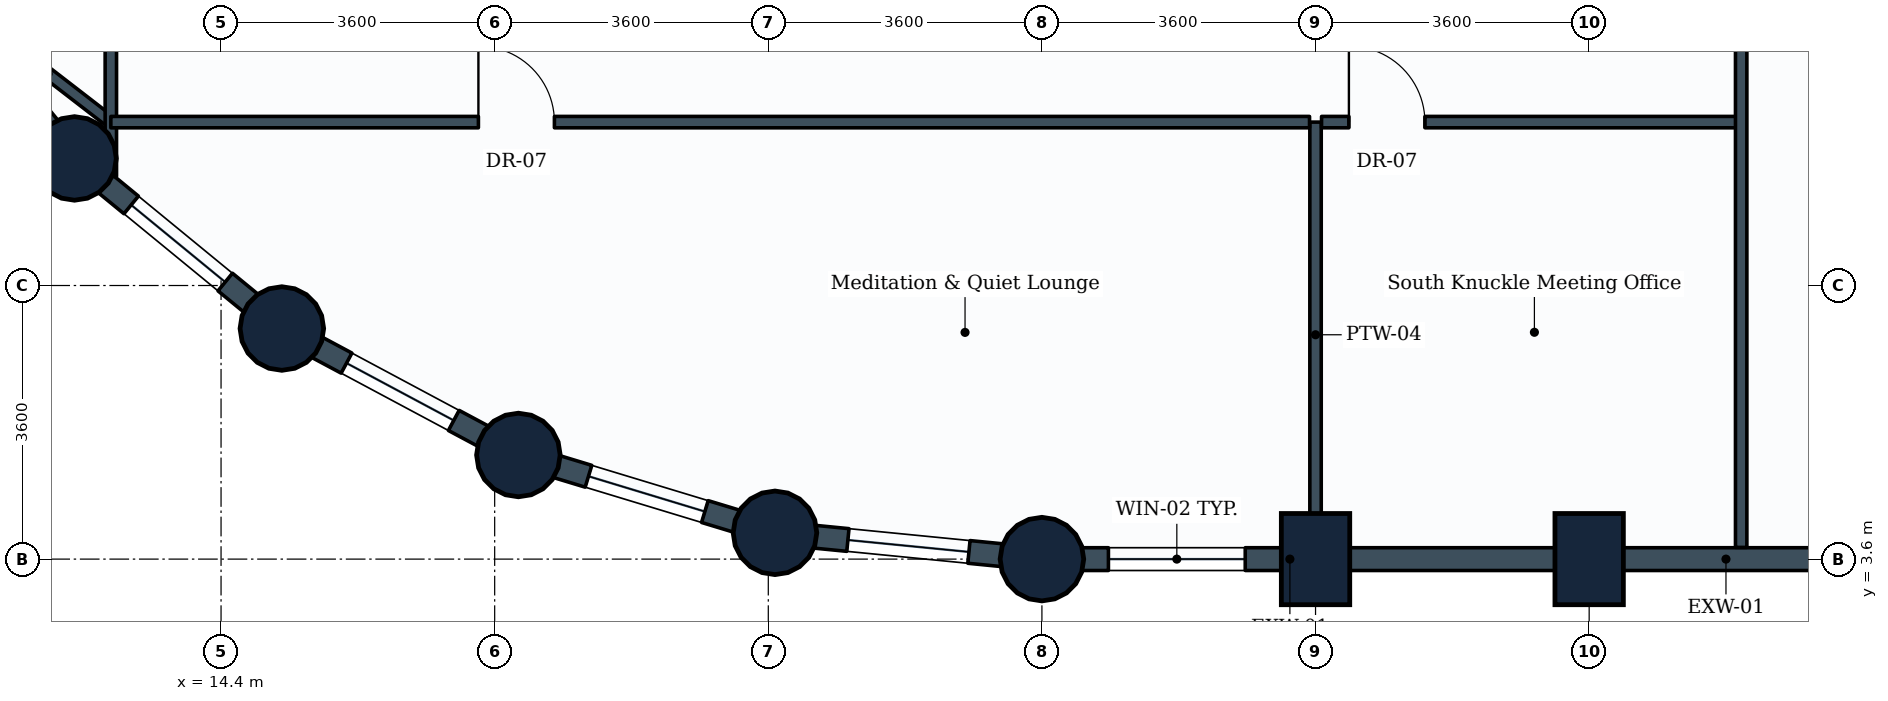
"""IFC4 building model, lengths in metres.
Left out: names, types, materials, properties, quantities, classifications, styles, units other than length and angle.
Written with IfcOpenShell. Run it as: python <this file> out.ifc"""

import sys

from ifc_helpers import new_model, si_unit, direction, frame, frame_2d, origin, origin_2d, place, context, subcontext, project, spatial, rectangle, circle, extrude, element, fill, save


model = new_model("IFC4")
c1 = context("Model", 3, precision=1e-05, world=origin(), true_north=direction((0.0, 1.0)))
c2 = subcontext(c1, "Body", "Model", "MODEL_VIEW")
j1 = project(units=[si_unit("LENGTHUNIT", "METRE"), si_unit("PLANEANGLEUNIT", "RADIAN")], contexts=[c1])
p1 = place(None, origin())
s1 = spatial("IfcSite", under=j1, at=p1, CompositionType="ELEMENT")
p2 = place(p1, origin())
s2 = spatial("IfcBuilding", under=s1, at=p2, CompositionType="ELEMENT")
p3 = place(p2, frame((0.0, 0.0, 55.2)))
s3 = spatial("IfcBuildingStorey", under=s2, at=p3, CompositionType="ELEMENT", Elevation=55.2)
for number, where, z_axis, x_axis in (
    (1, (12.472, 8.872, 0.0), (0.0, 0.0, 1.0), (1.0, 0.0, 0.0)),
    (2, (15.2, 6.634, 0.0), (0.0, 0.0, 1.0), (1.0, 0.0, 0.0)),
    (3, (18.312, 4.97, 0.0), (0.0, 0.0, 1.0), (1.0, 0.0, 0.0)),
    (4, (21.688, 3.946, 0.0), (0.0, 0.0, 1.0), (1.0, 0.0, 0.0)),
    (5, (25.2, 3.6, 0.0), (0.0, 0.0, 1.0), (1.0, 0.0, 0.0)),
):
    element("IfcColumn", number, at=place(p3, frame(where, z_axis=z_axis, x_axis=x_axis)), inside=s3, PredefinedType="COLUMN", context=c2, shape_type="SweptSolid", body=[
        extrude(circle(Radius=0.55, at=origin_2d()), origin(), (0.0, 0.0, 1.0), 3.9),
    ])
for number, where, z_axis, x_axis in (
    (6, (28.8, 3.6, 0.0), (0.0, 0.0, 1.0), (1.0, 0.0, 0.0)),
    (7, (32.4, 3.6, 0.0), (0.0, 0.0, 1.0), (1.0, 0.0, 0.0)),
):
    element("IfcColumn", number, at=place(p3, frame(where, z_axis=z_axis, x_axis=x_axis)), inside=s3, PredefinedType="COLUMN", context=c2, shape_type="SweptSolid", body=[
        extrude(rectangle(XDim=0.9, YDim=1.2, at=origin_2d()), origin(), (0.0, 0.0, 1.0), 3.9),
    ])
p4 = place(p3, frame((28.8, 3.6, 0.0), z_axis=(0.0, 0.0, 1.0), x_axis=(-1.0, 0.0, 0.0)))
e8 = element("IfcWall", 8, at=p4, inside=s3, PredefinedType="STANDARD", context=c2, shape_type="SweptSolid", body=[
    extrude(rectangle(XDim=3.6, YDim=0.3, at=frame_2d((1.8, 0.0))), origin(), (0.0, 0.0, 1.0), 2.93),
])
p5 = place(p4, frame((0.925, 0.0, 0.85)))
e9 = element("IfcOpeningElement", 9, at=p5, cuts=e8, PredefinedType="OPENING", context=c2, shape_type="SweptSolid", body=[
    extrude(rectangle(XDim=1.8, YDim=1.35, at=frame_2d((0.9, 0.675))), frame((0.0, 0.16, 0.0), z_axis=(0.0, -1.0, 0.0), x_axis=(1.0, 0.0, 0.0)), (0.0, 0.0, 1.0), 0.32),
])
p6 = place(p3, frame((32.4, 3.6, 0.0), z_axis=(0.0, 0.0, 1.0), x_axis=(-1.0, 0.0, 0.0)))
e10 = element("IfcWall", 10, at=p6, inside=s3, PredefinedType="STANDARD", context=c2, shape_type="SweptSolid", body=[
    extrude(rectangle(XDim=3.6, YDim=0.3, at=frame_2d((1.8, 0.0))), origin(), (0.0, 0.0, 1.0), 2.93),
])
p7 = place(p3, frame((36.0, 3.6, 0.0), z_axis=(0.0, 0.0, 1.0), x_axis=(-1.0, 0.0, 0.0)))
e11 = element("IfcWall", 11, at=p7, inside=s3, PredefinedType="STANDARD", context=c2, shape_type="SweptSolid", body=[
    extrude(rectangle(XDim=3.6, YDim=0.3, at=frame_2d((1.8, 0.0))), origin(), (0.0, 0.0, 1.0), 2.93),
])
p8 = place(p3, frame((12.472, 8.872, 0.0), z_axis=(0.0, 0.0, 1.0), x_axis=(-0.634258295121, 0.773121216285, 0.0)))
e12 = element("IfcWall", 12, at=p8, inside=s3, PredefinedType="STANDARD", context=c2, shape_type="SweptSolid", body=[
    extrude(rectangle(XDim=3.529, YDim=0.3, at=frame_2d((1.764, 0.0))), origin(), (0.0, 0.0, 1.0), 2.93),
])
p9 = place(p3, frame((15.2, 6.634, 0.0), z_axis=(0.0, 0.0, 1.0), x_axis=(-0.773121216285, 0.634258295121, 0.0)))
e13 = element("IfcWall", 13, at=p9, inside=s3, PredefinedType="STANDARD", context=c2, shape_type="SweptSolid", body=[
    extrude(rectangle(XDim=3.529, YDim=0.3, at=frame_2d((1.764, 0.0))), origin(), (0.0, 0.0, 1.0), 2.93),
])
p10 = place(p9, frame((0.964, 0.0, 0.85)))
e14 = element("IfcOpeningElement", 14, at=p10, cuts=e13, PredefinedType="OPENING", context=c2, shape_type="SweptSolid", body=[
    extrude(rectangle(XDim=1.6, YDim=1.35, at=frame_2d((0.8, 0.675))), frame((0.0, 0.16, 0.0), z_axis=(0.0, -1.0, 0.0), x_axis=(1.0, 0.0, 0.0)), (0.0, 0.0, 1.0), 0.32),
])
p11 = place(p3, frame((18.312, 4.97, 0.0), z_axis=(0.0, 0.0, 1.0), x_axis=(-0.881846862014, 0.471535907389, 0.0)))
e15 = element("IfcWall", 15, at=p11, inside=s3, PredefinedType="STANDARD", context=c2, shape_type="SweptSolid", body=[
    extrude(rectangle(XDim=3.529, YDim=0.3, at=frame_2d((1.765, 0.0))), origin(), (0.0, 0.0, 1.0), 2.93),
])
p12 = place(p11, frame((0.964, 0.0, 0.85)))
e16 = element("IfcOpeningElement", 16, at=p12, cuts=e15, PredefinedType="OPENING", context=c2, shape_type="SweptSolid", body=[
    extrude(rectangle(XDim=1.6, YDim=1.35, at=frame_2d((0.8, 0.675))), frame((0.0, 0.16, 0.0), z_axis=(0.0, -1.0, 0.0), x_axis=(1.0, 0.0, 0.0)), (0.0, 0.0, 1.0), 0.32),
])
p13 = place(p3, frame((21.688, 3.946, 0.0), z_axis=(0.0, 0.0, 1.0), x_axis=(-0.956953367403, 0.290241714123, 0.0)))
e17 = element("IfcWall", 17, at=p13, inside=s3, PredefinedType="STANDARD", context=c2, shape_type="SweptSolid", body=[
    extrude(rectangle(XDim=3.528, YDim=0.3, at=frame_2d((1.764, 0.0))), origin(), (0.0, 0.0, 1.0), 2.93),
])
p14 = place(p13, frame((0.964, 0.0, 0.85)))
e18 = element("IfcOpeningElement", 18, at=p14, cuts=e17, PredefinedType="OPENING", context=c2, shape_type="SweptSolid", body=[
    extrude(rectangle(XDim=1.6, YDim=1.35, at=frame_2d((0.8, 0.675))), frame((0.0, 0.16, 0.0), z_axis=(0.0, -1.0, 0.0), x_axis=(1.0, 0.0, 0.0)), (0.0, 0.0, 1.0), 0.32),
])
p15 = place(p3, frame((25.2, 3.6, 0.0), z_axis=(0.0, 0.0, 1.0), x_axis=(-0.995183369056, 0.098030923459, 0.0)))
e19 = element("IfcWall", 19, at=p15, inside=s3, PredefinedType="STANDARD", context=c2, shape_type="SweptSolid", body=[
    extrude(rectangle(XDim=3.529, YDim=0.3, at=frame_2d((1.765, 0.0))), origin(), (0.0, 0.0, 1.0), 2.93),
])
p16 = place(p15, frame((0.965, 0.0, 0.85)))
e20 = element("IfcOpeningElement", 20, at=p16, cuts=e19, PredefinedType="OPENING", context=c2, shape_type="SweptSolid", body=[
    extrude(rectangle(XDim=1.6, YDim=1.35, at=frame_2d((0.8, 0.675))), frame((0.0, 0.16, 0.0), z_axis=(0.0, -1.0, 0.0), x_axis=(1.0, 0.0, 0.0)), (0.0, 0.0, 1.0), 0.32),
])
p17 = place(p3, frame((28.8, 9.35, 0.0), z_axis=(0.0, 0.0, 1.0), x_axis=(0.0, -1.0, 0.0)))
e21 = element("IfcWall", 21, at=p17, inside=s3, PredefinedType="PARTITIONING", context=c2, shape_type="SweptSolid", body=[
    extrude(rectangle(XDim=5.596, YDim=0.15, at=frame_2d((2.798, 0.0))), origin(), (0.0, 0.0, 1.0), 3.635),
])
p18 = place(p3, frame((12.95, 9.35, 0.0), z_axis=(0.0, 0.0, 1.0), x_axis=(-0.791573423038, 0.611074067474, 0.0)))
e22 = element("IfcWall", 22, at=p18, inside=s3, PredefinedType="PARTITIONING", context=c2, shape_type="SweptSolid", body=[
    extrude(rectangle(XDim=2.084, YDim=0.15, at=frame_2d((1.042, 0.0))), origin(), (0.0, 0.0, 1.0), 2.93),
])
p19 = place(p3, frame((12.95, 8.634, 0.0), z_axis=(0.0, 0.0, 1.0), x_axis=(0.0, 1.0, 0.0)))
e23 = element("IfcWall", 23, at=p19, inside=s3, PredefinedType="PARTITIONING", context=c2, shape_type="SweptSolid", body=[
    extrude(rectangle(XDim=7.887, YDim=0.15, at=frame_2d((3.944, 0.0))), origin(), (0.0, 0.0, 1.0), 2.93),
])
p20 = place(p19, frame((4.947, 0.0, 0.0)))
e24 = element("IfcOpeningElement", 24, at=p20, cuts=e23, PredefinedType="OPENING", context=c2, shape_type="SweptSolid", body=[
    extrude(rectangle(XDim=1.0, YDim=2.1, at=frame_2d((0.5, 1.05))), frame((0.0, 0.085, 0.0), z_axis=(0.0, -1.0, 0.0), x_axis=(1.0, 0.0, 0.0)), (0.0, 0.0, 1.0), 0.17),
])
p21 = place(p3, frame((12.95, 9.35, 0.0), z_axis=(0.0, 0.0, 1.0), x_axis=(1.0, 0.0, 0.0)))
e25 = element("IfcWall", 25, at=p21, inside=s3, PredefinedType="PARTITIONING", context=c2, shape_type="SweptSolid", body=[
    extrude(rectangle(XDim=15.771, YDim=0.15, at=frame_2d((7.885, 0.0))), origin(), (0.0, 0.0, 1.0), 3.04),
])
p22 = place(p21, frame((4.836, 0.0, 0.0)))
e26 = element("IfcOpeningElement", 26, at=p22, cuts=e25, PredefinedType="OPENING", context=c2, shape_type="SweptSolid", body=[
    extrude(rectangle(XDim=1.0, YDim=2.1, at=frame_2d((0.5, 1.05))), frame((0.0, 0.085, 0.0), z_axis=(0.0, -1.0, 0.0), x_axis=(1.0, 0.0, 0.0)), (0.0, 0.0, 1.0), 0.17),
])
p23 = place(p3, frame((28.879, 9.35, 0.0), z_axis=(0.0, 0.0, 1.0), x_axis=(1.0, 0.0, 0.0)))
e27 = element("IfcWall", 27, at=p23, inside=s3, PredefinedType="PARTITIONING", context=c2, shape_type="SweptSolid", body=[
    extrude(rectangle(XDim=5.521, YDim=0.15, at=frame_2d((2.76, 0.0))), origin(), (0.0, 0.0, 1.0), 3.635),
])
p24 = place(p23, frame((0.36, 0.0, 0.0)))
e28 = element("IfcOpeningElement", 28, at=p24, cuts=e27, PredefinedType="OPENING", context=c2, shape_type="SweptSolid", body=[
    extrude(rectangle(XDim=1.0, YDim=2.1, at=frame_2d((0.5, 1.05))), frame((0.0, 0.085, 0.0), z_axis=(0.0, -1.0, 0.0), x_axis=(1.0, 0.0, 0.0)), (0.0, 0.0, 1.0), 0.17),
])
p25 = place(p3, frame((34.4, 3.754, 0.0), z_axis=(0.0, 0.0, 1.0), x_axis=(0.0, 1.0, 0.0)))
e29 = element("IfcWall", 29, at=p25, inside=s3, PredefinedType="PARTITIONING", context=c2, shape_type="SweptSolid", body=[
    extrude(rectangle(XDim=14.096, YDim=0.15, at=frame_2d((7.048, 0.0))), origin(), (0.0, 0.0, 1.0), 2.93),
])
p26 = place(p5, origin())
e30 = element("IfcWindow", 30, at=p26, inside=s3, PartitioningType="SINGLE_PANEL", PredefinedType="WINDOW", context=c2, shape_type="SweptSolid", body=[
    extrude(rectangle(XDim=1.8, YDim=1.35, at=frame_2d((0.9, 0.675))), frame((0.0, 0.03, 0.0), z_axis=(0.0, -1.0, 0.0), x_axis=(1.0, 0.0, 0.0)), (0.0, 0.0, 1.0), 0.06),
])
fill(e9, e30)
p27 = place(p10, origin())
e31 = element("IfcWindow", 31, at=p27, inside=s3, PartitioningType="SINGLE_PANEL", PredefinedType="WINDOW", context=c2, shape_type="SweptSolid", body=[
    extrude(rectangle(XDim=1.6, YDim=1.35, at=frame_2d((0.8, 0.675))), frame((0.0, 0.03, 0.0), z_axis=(0.0, -1.0, 0.0), x_axis=(1.0, 0.0, 0.0)), (0.0, 0.0, 1.0), 0.06),
])
fill(e14, e31)
p28 = place(p12, origin())
e32 = element("IfcWindow", 32, at=p28, inside=s3, PartitioningType="SINGLE_PANEL", PredefinedType="WINDOW", context=c2, shape_type="SweptSolid", body=[
    extrude(rectangle(XDim=1.6, YDim=1.35, at=frame_2d((0.8, 0.675))), frame((0.0, 0.03, 0.0), z_axis=(0.0, -1.0, 0.0), x_axis=(1.0, 0.0, 0.0)), (0.0, 0.0, 1.0), 0.06),
])
fill(e16, e32)
p29 = place(p14, origin())
e33 = element("IfcWindow", 33, at=p29, inside=s3, PartitioningType="SINGLE_PANEL", PredefinedType="WINDOW", context=c2, shape_type="SweptSolid", body=[
    extrude(rectangle(XDim=1.6, YDim=1.35, at=frame_2d((0.8, 0.675))), frame((0.0, 0.03, 0.0), z_axis=(0.0, -1.0, 0.0), x_axis=(1.0, 0.0, 0.0)), (0.0, 0.0, 1.0), 0.06),
])
fill(e18, e33)
p30 = place(p16, origin())
e34 = element("IfcWindow", 34, at=p30, inside=s3, PartitioningType="SINGLE_PANEL", PredefinedType="WINDOW", context=c2, shape_type="SweptSolid", body=[
    extrude(rectangle(XDim=1.6, YDim=1.35, at=frame_2d((0.8, 0.675))), frame((0.0, 0.03, 0.0), z_axis=(0.0, -1.0, 0.0), x_axis=(1.0, 0.0, 0.0)), (0.0, 0.0, 1.0), 0.06),
])
fill(e20, e34)
p31 = place(p22, origin())
e35 = element("IfcDoor", 35, at=p31, inside=s3, OperationType="SINGLE_SWING_LEFT", PredefinedType="DOOR", context=c2, shape_type="SweptSolid", body=[
    extrude(rectangle(XDim=1.0, YDim=2.1, at=frame_2d((0.5, 1.05))), frame((0.0, 0.025, 0.0), z_axis=(0.0, -1.0, 0.0), x_axis=(1.0, 0.0, 0.0)), (0.0, 0.0, 1.0), 0.05),
])
fill(e26, e35)
p32 = place(p24, origin())
e36 = element("IfcDoor", 36, at=p32, inside=s3, OperationType="SINGLE_SWING_LEFT", PredefinedType="DOOR", context=c2, shape_type="SweptSolid", body=[
    extrude(rectangle(XDim=1.0, YDim=2.1, at=frame_2d((0.5, 1.05))), frame((0.0, 0.025, 0.0), z_axis=(0.0, -1.0, 0.0), x_axis=(1.0, 0.0, 0.0)), (0.0, 0.0, 1.0), 0.05),
])
fill(e28, e36)
save(model, sys.argv[1])
